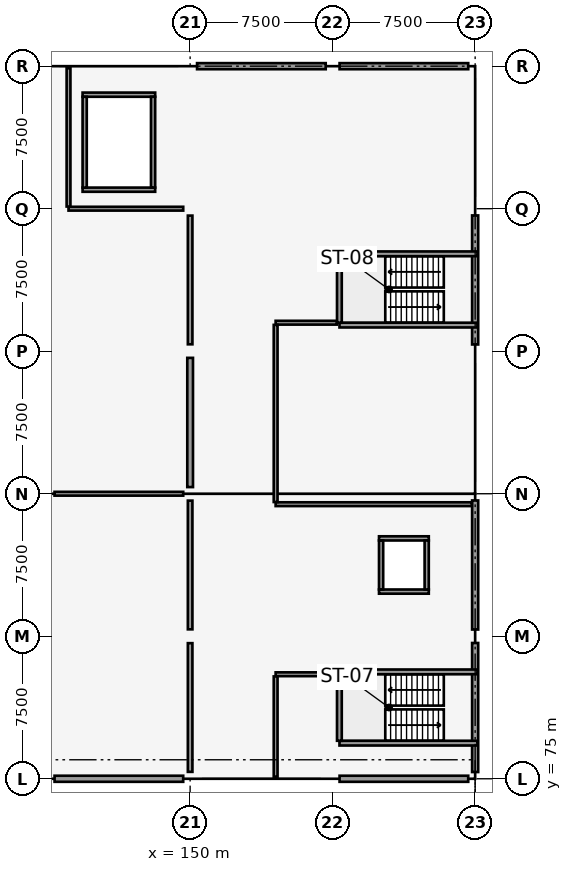
"""IFC4 building model, lengths in metres.
Left out: names, types, materials, properties, quantities, classifications, styles, units other than length and angle.
Written with IfcOpenShell. Run it as: python <this file> out.ifc"""

import sys

from ifc_helpers import new_model, si_unit, direction, frame, frame_2d, origin, origin_2d, place, context, subcontext, project, spatial, rectangle, extrude, element, fill, save


model = new_model("IFC4")
c1 = context("Model", 3, precision=1e-05, world=origin(), true_north=direction((0.0, 1.0)))
c2 = subcontext(c1, "Body", "Model", "MODEL_VIEW")
j1 = project(units=[si_unit("LENGTHUNIT", "METRE"), si_unit("PLANEANGLEUNIT", "RADIAN")], contexts=[c1])
p1 = place(None, origin())
s1 = spatial("IfcSite", under=j1, at=p1, CompositionType="ELEMENT")
p2 = place(p1, origin())
s2 = spatial("IfcBuilding", under=s1, at=p2, CompositionType="ELEMENT")
p3 = place(p2, frame((0.0, 0.0, 4.8)))
s3 = spatial("IfcBuildingStorey", under=s2, at=p3, CompositionType="ELEMENT", Elevation=4.8)
for number, where, z_axis, x_axis in (
    (1, (142.5, 75.0, 0.0), (0.0, 0.0, 1.0), (1.0, 0.0, 0.0)),
    (2, (142.5, 90.0, 0.0), (0.0, 0.0, 1.0), (1.0, 0.0, 0.0)),
    (3, (142.5, 97.5, 0.0), (0.0, 0.0, 1.0), (1.0, 0.0, 0.0)),
    (4, (142.5, 105.0, 0.0), (0.0, 0.0, 1.0), (1.0, 0.0, 0.0)),
    (5, (142.5, 112.5, 0.0), (0.0, 0.0, 1.0), (1.0, 0.0, 0.0)),
    (6, (150.0, 75.0, 0.0), (0.0, 0.0, 1.0), (1.0, 0.0, 0.0)),
    (7, (150.0, 82.5, 0.0), (0.0, 0.0, 1.0), (1.0, 0.0, 0.0)),
    (8, (150.0, 90.0, 0.0), (0.0, 0.0, 1.0), (1.0, 0.0, 0.0)),
    (9, (150.0, 97.5, 0.0), (0.0, 0.0, 1.0), (1.0, 0.0, 0.0)),
    (10, (150.0, 105.0, 0.0), (0.0, 0.0, 1.0), (1.0, 0.0, 0.0)),
    (11, (150.0, 112.5, 0.0), (0.0, 0.0, 1.0), (1.0, 0.0, 0.0)),
    (12, (157.5, 75.0, 0.0), (0.0, 0.0, 1.0), (1.0, 0.0, 0.0)),
    (13, (157.5, 82.5, 0.0), (0.0, 0.0, 1.0), (1.0, 0.0, 0.0)),
    (14, (157.5, 90.0, 0.0), (0.0, 0.0, 1.0), (1.0, 0.0, 0.0)),
    (15, (157.5, 97.5, 0.0), (0.0, 0.0, 1.0), (1.0, 0.0, 0.0)),
    (16, (157.5, 105.0, 0.0), (0.0, 0.0, 1.0), (1.0, 0.0, 0.0)),
    (17, (157.5, 112.5, 0.0), (0.0, 0.0, 1.0), (1.0, 0.0, 0.0)),
    (18, (165.0, 75.0, 0.0), (0.0, 0.0, 1.0), (1.0, 0.0, 0.0)),
    (19, (165.0, 82.5, 0.0), (0.0, 0.0, 1.0), (1.0, 0.0, 0.0)),
    (20, (165.0, 90.0, 0.0), (0.0, 0.0, 1.0), (1.0, 0.0, 0.0)),
    (21, (165.0, 97.5, 0.0), (0.0, 0.0, 1.0), (1.0, 0.0, 0.0)),
    (22, (165.0, 105.0, 0.0), (0.0, 0.0, 1.0), (1.0, 0.0, 0.0)),
    (23, (165.0, 112.5, 0.0), (0.0, 0.0, 1.0), (1.0, 0.0, 0.0)),
):
    element("IfcColumn", number, at=place(p3, frame(where, z_axis=z_axis, x_axis=x_axis)), inside=s3, PredefinedType="COLUMN", context=c2, shape_type="SweptSolid", body=[
        extrude(rectangle(XDim=0.7, YDim=0.7, at=origin_2d()), origin(), (0.0, 0.0, 1.0), 4.2),
    ])
p4 = place(p3, frame((165.0, 86.25, 0.0), z_axis=(0.0, 0.0, 1.0), x_axis=(1.0, 0.0, 0.0)))
e24 = element("IfcColumn", 24, at=p4, inside=s3, PredefinedType="PILASTER", context=c2, shape_type="SweptSolid", body=[
    extrude(rectangle(XDim=0.4, YDim=0.7, at=origin_2d()), origin(), (0.0, 0.0, 1.0), 4.2),
])
p5 = place(p3, frame((150.0, 90.35, 0.0), z_axis=(0.0, 0.0, 1.0), x_axis=(0.0, 1.0, 0.0)))
e25 = element("IfcWall", 25, at=p5, inside=s3, PredefinedType="SHEAR", context=c2, shape_type="SweptSolid", body=[
    extrude(rectangle(XDim=6.8, YDim=0.3, at=frame_2d((3.4, 0.0))), origin(), (0.0, 0.0, 1.0), 3.9),
])
p6 = place(p3, frame((142.865, 75.0, 0.0), z_axis=(0.0, 0.0, 1.0), x_axis=(1.0, 0.0, 0.0)))
e26 = element("IfcWall", 26, at=p6, inside=s3, PredefinedType="SOLIDWALL", context=c2, shape_type="SweptSolid", body=[
    extrude(rectangle(XDim=6.77, YDim=0.32, at=frame_2d((3.385, 0.0))), origin(), (0.0, 0.0, 1.0), 2.89),
])
p7 = place(p6, frame((2.385, 0.0, 0.6)))
e27 = element("IfcOpeningElement", 27, at=p7, cuts=e26, PredefinedType="OPENING", context=c2, shape_type="SweptSolid", body=[
    extrude(rectangle(XDim=2.0, YDim=1.45, at=frame_2d((1.0, 0.725))), frame((0.0, 0.17, 0.0), z_axis=(0.0, -1.0, 0.0), x_axis=(1.0, 0.0, 0.0)), (0.0, 0.0, 1.0), 0.34),
])
p8 = place(p3, frame((150.365, 112.5, 0.0), z_axis=(0.0, 0.0, 1.0), x_axis=(1.0, 0.0, 0.0)))
e28 = element("IfcWall", 28, at=p8, inside=s3, PredefinedType="SOLIDWALL", context=c2, shape_type="SweptSolid", body=[
    extrude(rectangle(XDim=6.77, YDim=0.32, at=frame_2d((3.385, 0.0))), origin(), (0.0, 0.0, 1.0), 3.14),
])
p9 = place(p8, frame((2.235, 0.0, 0.6)))
e29 = element("IfcOpeningElement", 29, at=p9, cuts=e28, PredefinedType="OPENING", context=c2, shape_type="SweptSolid", body=[
    extrude(rectangle(XDim=2.3, YDim=1.3, at=frame_2d((1.15, 0.65))), frame((0.0, 0.17, 0.0), z_axis=(0.0, -1.0, 0.0), x_axis=(1.0, 0.0, 0.0)), (0.0, 0.0, 1.0), 0.34),
])
p10 = place(p3, frame((157.865, 75.0, 0.0), z_axis=(0.0, 0.0, 1.0), x_axis=(1.0, 0.0, 0.0)))
e30 = element("IfcWall", 30, at=p10, inside=s3, PredefinedType="SOLIDWALL", context=c2, shape_type="SweptSolid", body=[
    extrude(rectangle(XDim=6.77, YDim=0.32, at=frame_2d((3.385, 0.0))), origin(), (0.0, 0.0, 1.0), 3.14),
])
p11 = place(p10, frame((2.81, 0.0, 0.6)))
e31 = element("IfcOpeningElement", 31, at=p11, cuts=e30, PredefinedType="OPENING", context=c2, shape_type="SweptSolid", body=[
    extrude(rectangle(XDim=1.15, YDim=1.3, at=frame_2d((0.575, 0.65))), frame((0.0, 0.17, 0.0), z_axis=(0.0, -1.0, 0.0), x_axis=(1.0, 0.0, 0.0)), (0.0, 0.0, 1.0), 0.34),
])
p12 = place(p3, frame((157.865, 112.5, 0.0), z_axis=(0.0, 0.0, 1.0), x_axis=(1.0, 0.0, 0.0)))
e32 = element("IfcWall", 32, at=p12, inside=s3, PredefinedType="SOLIDWALL", context=c2, shape_type="SweptSolid", body=[
    extrude(rectangle(XDim=6.77, YDim=0.32, at=frame_2d((3.385, 0.0))), origin(), (0.0, 0.0, 1.0), 3.14),
])
p13 = place(p12, frame((2.785, 0.0, 0.6)))
e33 = element("IfcOpeningElement", 33, at=p13, cuts=e32, PredefinedType="OPENING", context=c2, shape_type="SweptSolid", body=[
    extrude(rectangle(XDim=1.2, YDim=1.2, at=frame_2d((0.6, 0.6))), frame((0.0, 0.17, 0.0), z_axis=(0.0, -1.0, 0.0), x_axis=(1.0, 0.0, 0.0)), (0.0, 0.0, 1.0), 0.34),
])
p14 = place(p3, frame((165.0, 75.355, 0.0), z_axis=(0.0, 0.0, 1.0), x_axis=(0.0, 1.0, 0.0)))
e34 = element("IfcWall", 34, at=p14, inside=s3, PredefinedType="SOLIDWALL", context=c2, shape_type="SweptSolid", body=[
    extrude(rectangle(XDim=6.79, YDim=0.32, at=frame_2d((3.395, 0.0))), origin(), (0.0, 0.0, 1.0), 3.09),
])
p15 = place(p3, frame((165.0, 82.855, 0.0), z_axis=(0.0, 0.0, 1.0), x_axis=(0.0, 1.0, 0.0)))
e35 = element("IfcWall", 35, at=p15, inside=s3, PredefinedType="SOLIDWALL", context=c2, shape_type="SweptSolid", body=[
    extrude(rectangle(XDim=6.79, YDim=0.32, at=frame_2d((3.395, 0.0))), origin(), (0.0, 0.0, 1.0), 3.04),
])
p16 = place(p3, frame((165.0, 97.855, 0.0), z_axis=(0.0, 0.0, 1.0), x_axis=(0.0, 1.0, 0.0)))
e36 = element("IfcWall", 36, at=p16, inside=s3, PredefinedType="SOLIDWALL", context=c2, shape_type="SweptSolid", body=[
    extrude(rectangle(XDim=6.79, YDim=0.32, at=frame_2d((3.395, 0.0))), origin(), (0.0, 0.0, 1.0), 2.84),
])
p17 = place(p3, frame((157.86, 76.875, 0.0), z_axis=(0.0, 0.0, 1.0), x_axis=(1.0, 0.0, 0.0)))
e37 = element("IfcWall", 37, at=p17, inside=s3, PredefinedType="SOLIDWALL", context=c2, shape_type="SweptSolid", body=[
    extrude(rectangle(XDim=7.26, YDim=0.25, at=frame_2d((3.63, 0.0))), origin(), (0.0, 0.0, 1.0), 3.92),
])
p18 = place(p3, frame((157.86, 80.625, 0.0), z_axis=(0.0, 0.0, 1.0), x_axis=(1.0, 0.0, 0.0)))
e38 = element("IfcWall", 38, at=p18, inside=s3, PredefinedType="SOLIDWALL", context=c2, shape_type="SweptSolid", body=[
    extrude(rectangle(XDim=7.26, YDim=0.25, at=frame_2d((3.63, 0.0))), origin(), (0.0, 0.0, 1.0), 3.92),
])
p19 = place(p18, frame((5.71, 0.0, 0.0)))
e39 = element("IfcOpeningElement", 39, at=p19, cuts=e38, PredefinedType="OPENING", context=c2, shape_type="SweptSolid", body=[
    extrude(rectangle(XDim=1.1, YDim=2.15, at=frame_2d((0.55, 1.075))), frame((0.0, 0.135, 0.0), z_axis=(0.0, -1.0, 0.0), x_axis=(1.0, 0.0, 0.0)), (0.0, 0.0, 1.0), 0.27),
])
p20 = place(p3, frame((157.855, 77.0, 0.0), z_axis=(0.0, 0.0, 1.0), x_axis=(0.0, 1.0, 0.0)))
e40 = element("IfcWall", 40, at=p20, inside=s3, PredefinedType="SOLIDWALL", context=c2, shape_type="SweptSolid", body=[
    extrude(rectangle(XDim=3.5, YDim=0.25, at=frame_2d((1.75, 0.0))), origin(), (0.0, 0.0, 1.0), 3.92),
])
p21 = place(p3, frame((157.86, 98.875, 0.0), z_axis=(0.0, 0.0, 1.0), x_axis=(1.0, 0.0, 0.0)))
e41 = element("IfcWall", 41, at=p21, inside=s3, PredefinedType="SOLIDWALL", context=c2, shape_type="SweptSolid", body=[
    extrude(rectangle(XDim=7.26, YDim=0.25, at=frame_2d((3.63, 0.0))), origin(), (0.0, 0.0, 1.0), 3.92),
])
p22 = place(p3, frame((157.86, 102.625, 0.0), z_axis=(0.0, 0.0, 1.0), x_axis=(1.0, 0.0, 0.0)))
e42 = element("IfcWall", 42, at=p22, inside=s3, PredefinedType="SOLIDWALL", context=c2, shape_type="SweptSolid", body=[
    extrude(rectangle(XDim=7.26, YDim=0.25, at=frame_2d((3.63, 0.0))), origin(), (0.0, 0.0, 1.0), 3.92),
])
p23 = place(p22, frame((5.71, 0.0, 0.0)))
e43 = element("IfcOpeningElement", 43, at=p23, cuts=e42, PredefinedType="OPENING", context=c2, shape_type="SweptSolid", body=[
    extrude(rectangle(XDim=1.1, YDim=2.15, at=frame_2d((0.55, 1.075))), frame((0.0, 0.135, 0.0), z_axis=(0.0, -1.0, 0.0), x_axis=(1.0, 0.0, 0.0)), (0.0, 0.0, 1.0), 0.27),
])
p24 = place(p3, frame((157.855, 99.0, 0.0), z_axis=(0.0, 0.0, 1.0), x_axis=(0.0, 1.0, 0.0)))
e44 = element("IfcWall", 44, at=p24, inside=s3, PredefinedType="SOLIDWALL", context=c2, shape_type="SweptSolid", body=[
    extrude(rectangle(XDim=3.5, YDim=0.25, at=frame_2d((1.75, 0.0))), origin(), (0.0, 0.0, 1.0), 3.92),
])
for number, where, z_axis, x_axis in (
    (45, (159.94, 84.85, 0.0), (0.0, 0.0, 1.0), (1.0, 0.0, 0.0)),
    (46, (159.94, 87.65, 0.0), (0.0, 0.0, 1.0), (1.0, 0.0, 0.0)),
):
    element("IfcWall", number, at=place(p3, frame(where, z_axis=z_axis, x_axis=x_axis)), inside=s3, PredefinedType="SOLIDWALL", context=c2, shape_type="SweptSolid", body=[
        extrude(rectangle(XDim=2.62, YDim=0.22, at=frame_2d((1.31, 0.0))), origin(), (0.0, 0.0, 1.0), 3.92),
    ])
p25 = place(p3, frame((160.05, 84.96, 0.0), z_axis=(0.0, 0.0, 1.0), x_axis=(0.0, 1.0, 0.0)))
e47 = element("IfcWall", 47, at=p25, inside=s3, PredefinedType="SOLIDWALL", context=c2, shape_type="SweptSolid", body=[
    extrude(rectangle(XDim=2.58, YDim=0.22, at=frame_2d((1.29, 0.0))), origin(), (0.0, 0.0, 1.0), 3.92),
])
p26 = place(p25, frame((0.79, 0.0, 0.0)))
e48 = element("IfcOpeningElement", 48, at=p26, cuts=e47, PredefinedType="OPENING", context=c2, shape_type="SweptSolid", body=[
    extrude(rectangle(XDim=1.0, YDim=2.15, at=frame_2d((0.5, 1.075))), frame((0.0, 0.12, 0.0), z_axis=(0.0, -1.0, 0.0), x_axis=(1.0, 0.0, 0.0)), (0.0, 0.0, 1.0), 0.24),
])
p27 = place(p3, frame((162.45, 84.96, 0.0), z_axis=(0.0, 0.0, 1.0), x_axis=(0.0, 1.0, 0.0)))
e49 = element("IfcWall", 49, at=p27, inside=s3, PredefinedType="SOLIDWALL", context=c2, shape_type="SweptSolid", body=[
    extrude(rectangle(XDim=2.58, YDim=0.22, at=frame_2d((1.29, 0.0))), origin(), (0.0, 0.0, 1.0), 3.92),
])
p28 = place(p3, frame((144.34, 106.0, 0.0), z_axis=(0.0, 0.0, 1.0), x_axis=(1.0, 0.0, 0.0)))
e50 = element("IfcWall", 50, at=p28, inside=s3, PredefinedType="SOLIDWALL", context=c2, shape_type="SweptSolid", body=[
    extrude(rectangle(XDim=3.82, YDim=0.22, at=frame_2d((1.91, 0.0))), origin(), (0.0, 0.0, 1.0), 3.92),
])
p29 = place(p28, frame((0.81, 0.0, 0.0)))
e51 = element("IfcOpeningElement", 51, at=p29, cuts=e50, PredefinedType="OPENING", context=c2, shape_type="SweptSolid", body=[
    extrude(rectangle(XDim=2.2, YDim=2.35, at=frame_2d((1.1, 1.175))), frame((0.0, 0.12, 0.0), z_axis=(0.0, -1.0, 0.0), x_axis=(1.0, 0.0, 0.0)), (0.0, 0.0, 1.0), 0.24),
])
p30 = place(p3, frame((144.34, 111.0, 0.0), z_axis=(0.0, 0.0, 1.0), x_axis=(1.0, 0.0, 0.0)))
e52 = element("IfcWall", 52, at=p30, inside=s3, PredefinedType="SOLIDWALL", context=c2, shape_type="SweptSolid", body=[
    extrude(rectangle(XDim=3.82, YDim=0.22, at=frame_2d((1.91, 0.0))), origin(), (0.0, 0.0, 1.0), 3.92),
])
for number, where, z_axis, x_axis in (
    (53, (144.45, 106.11, 0.0), (0.0, 0.0, 1.0), (0.0, 1.0, 0.0)),
    (54, (148.05, 106.11, 0.0), (0.0, 0.0, 1.0), (0.0, 1.0, 0.0)),
):
    element("IfcWall", number, at=place(p3, frame(where, z_axis=z_axis, x_axis=x_axis)), inside=s3, PredefinedType="SOLIDWALL", context=c2, shape_type="SweptSolid", body=[
        extrude(rectangle(XDim=4.78, YDim=0.22, at=frame_2d((2.39, 0.0))), origin(), (0.0, 0.0, 1.0), 3.92),
    ])
p31 = place(p3, frame((143.6, 105.0, 0.0), z_axis=(0.0, 0.0, 1.0), x_axis=(1.0, 0.0, 0.0)))
e55 = element("IfcWall", 55, at=p31, inside=s3, PredefinedType="PARTITIONING", context=c2, shape_type="SweptSolid", body=[
    extrude(rectangle(XDim=6.036, YDim=0.2, at=frame_2d((3.018, 0.0))), origin(), (0.0, 0.0, 1.0), 3.04),
])
p32 = place(p3, frame((143.6, 105.114, 0.0), z_axis=(0.0, 0.0, 1.0), x_axis=(0.0, 1.0, 0.0)))
e56 = element("IfcWall", 56, at=p32, inside=s3, PredefinedType="PARTITIONING", context=c2, shape_type="SweptSolid", body=[
    extrude(rectangle(XDim=7.274, YDim=0.2, at=frame_2d((3.637, 0.0))), origin(), (0.0, 0.0, 1.0), 3.04),
])
p33 = place(p32, frame((2.786, 0.0, 0.0)))
e57 = element("IfcOpeningElement", 57, at=p33, cuts=e56, PredefinedType="OPENING", context=c2, shape_type="SweptSolid", body=[
    extrude(rectangle(XDim=1.2, YDim=2.15, at=frame_2d((0.6, 1.075))), frame((0.0, 0.11, 0.0), z_axis=(0.0, -1.0, 0.0), x_axis=(1.0, 0.0, 0.0)), (0.0, 0.0, 1.0), 0.22),
])
p34 = place(p3, frame((154.5, 80.5, 0.0), z_axis=(0.0, 0.0, 1.0), x_axis=(1.0, 0.0, 0.0)))
e58 = element("IfcWall", 58, at=p34, inside=s3, PredefinedType="PARTITIONING", context=c2, shape_type="SweptSolid", body=[
    extrude(rectangle(XDim=3.216, YDim=0.2, at=frame_2d((1.608, 0.0))), origin(), (0.0, 0.0, 1.0), 3.19),
])
p35 = place(p3, frame((154.5, 75.112, 0.0), z_axis=(0.0, 0.0, 1.0), x_axis=(0.0, 1.0, 0.0)))
e59 = element("IfcWall", 59, at=p35, inside=s3, PredefinedType="PARTITIONING", context=c2, shape_type="SweptSolid", body=[
    extrude(rectangle(XDim=5.274, YDim=0.2, at=frame_2d((2.637, 0.0))), origin(), (0.0, 0.0, 1.0), 3.14),
])
p36 = place(p3, frame((154.5, 89.45, 0.0), z_axis=(0.0, 0.0, 1.0), x_axis=(1.0, 0.0, 0.0)))
e60 = element("IfcWall", 60, at=p36, inside=s3, PredefinedType="PARTITIONING", context=c2, shape_type="SweptSolid", body=[
    extrude(rectangle(XDim=10.326, YDim=0.2, at=frame_2d((5.163, 0.0))), origin(), (0.0, 0.0, 1.0), 2.84),
])
p37 = place(p3, frame((154.5, 99.0, 0.0), z_axis=(0.0, 0.0, 1.0), x_axis=(1.0, 0.0, 0.0)))
e61 = element("IfcWall", 61, at=p37, inside=s3, PredefinedType="PARTITIONING", context=c2, shape_type="SweptSolid", body=[
    extrude(rectangle(XDim=3.216, YDim=0.2, at=frame_2d((1.608, 0.0))), origin(), (0.0, 0.0, 1.0), 3.27),
])
p38 = place(p3, frame((154.5, 89.564, 0.0), z_axis=(0.0, 0.0, 1.0), x_axis=(0.0, 1.0, 0.0)))
e62 = element("IfcWall", 62, at=p38, inside=s3, PredefinedType="PARTITIONING", context=c2, shape_type="SweptSolid", body=[
    extrude(rectangle(XDim=9.322, YDim=0.2, at=frame_2d((4.661, 0.0))), origin(), (0.0, 0.0, 1.0), 2.84),
])
p39 = place(p38, frame((4.086, 0.0, 0.0)))
e63 = element("IfcOpeningElement", 63, at=p39, cuts=e62, PredefinedType="OPENING", context=c2, shape_type="SweptSolid", body=[
    extrude(rectangle(XDim=1.1, YDim=2.15, at=frame_2d((0.55, 1.075))), frame((0.0, 0.11, 0.0), z_axis=(0.0, -1.0, 0.0), x_axis=(1.0, 0.0, 0.0)), (0.0, 0.0, 1.0), 0.22),
])
p40 = place(p3, frame((142.864, 90.0, 0.0), z_axis=(0.0, 0.0, 1.0), x_axis=(1.0, 0.0, 0.0)))
e64 = element("IfcWall", 64, at=p40, inside=s3, PredefinedType="PARTITIONING", context=c2, shape_type="SweptSolid", body=[
    extrude(rectangle(XDim=6.772, YDim=0.2, at=frame_2d((3.386, 0.0))), origin(), (0.0, 0.0, 1.0), 2.84),
])
p41 = place(p3, frame((150.0, 75.364, 0.0), z_axis=(0.0, 0.0, 1.0), x_axis=(0.0, 1.0, 0.0)))
e65 = element("IfcWall", 65, at=p41, inside=s3, PredefinedType="PARTITIONING", context=c2, shape_type="SweptSolid", body=[
    extrude(rectangle(XDim=6.772, YDim=0.24, at=frame_2d((3.386, 0.0))), origin(), (0.0, 0.0, 1.0), 2.94),
])
p42 = place(p41, frame((2.586, 0.0, 0.0)))
e66 = element("IfcOpeningElement", 66, at=p42, cuts=e65, PredefinedType="OPENING", context=c2, shape_type="SweptSolid", body=[
    extrude(rectangle(XDim=1.6, YDim=2.16, at=frame_2d((0.8, 1.08))), frame((0.0, 0.13, 0.0), z_axis=(0.0, -1.0, 0.0), x_axis=(1.0, 0.0, 0.0)), (0.0, 0.0, 1.0), 0.26),
])
p43 = place(p3, frame((150.0, 82.864, 0.0), z_axis=(0.0, 0.0, 1.0), x_axis=(0.0, 1.0, 0.0)))
e67 = element("IfcWall", 67, at=p43, inside=s3, PredefinedType="PARTITIONING", context=c2, shape_type="SweptSolid", body=[
    extrude(rectangle(XDim=6.772, YDim=0.24, at=frame_2d((3.386, 0.0))), origin(), (0.0, 0.0, 1.0), 2.84),
])
p44 = place(p3, frame((150.0, 97.864, 0.0), z_axis=(0.0, 0.0, 1.0), x_axis=(0.0, 1.0, 0.0)))
e68 = element("IfcWall", 68, at=p44, inside=s3, PredefinedType="PARTITIONING", context=c2, shape_type="SweptSolid", body=[
    extrude(rectangle(XDim=6.772, YDim=0.24, at=frame_2d((3.386, 0.0))), origin(), (0.0, 0.0, 1.0), 2.99),
])
p45 = place(p44, frame((2.586, 0.0, 0.0)))
e69 = element("IfcOpeningElement", 69, at=p45, cuts=e68, PredefinedType="OPENING", context=c2, shape_type="SweptSolid", body=[
    extrude(rectangle(XDim=1.6, YDim=2.16, at=frame_2d((0.8, 1.08))), frame((0.0, 0.13, 0.0), z_axis=(0.0, -1.0, 0.0), x_axis=(1.0, 0.0, 0.0)), (0.0, 0.0, 1.0), 0.26),
])
p46 = place(p7, origin())
e70 = element("IfcWindow", 70, at=p46, inside=s3, PartitioningType="SINGLE_PANEL", PredefinedType="WINDOW", context=c2, shape_type="SweptSolid", body=[
    extrude(rectangle(XDim=2.0, YDim=1.45, at=frame_2d((1.0, 0.725))), frame((0.0, 0.03, 0.0), z_axis=(0.0, -1.0, 0.0), x_axis=(1.0, 0.0, 0.0)), (0.0, 0.0, 1.0), 0.06),
])
fill(e27, e70)
p47 = place(p9, origin())
e71 = element("IfcWindow", 71, at=p47, inside=s3, PartitioningType="SINGLE_PANEL", PredefinedType="WINDOW", context=c2, shape_type="SweptSolid", body=[
    extrude(rectangle(XDim=2.3, YDim=1.3, at=frame_2d((1.15, 0.65))), frame((0.0, 0.03, 0.0), z_axis=(0.0, -1.0, 0.0), x_axis=(1.0, 0.0, 0.0)), (0.0, 0.0, 1.0), 0.06),
])
fill(e29, e71)
p48 = place(p11, origin())
e72 = element("IfcWindow", 72, at=p48, inside=s3, PartitioningType="SINGLE_PANEL", PredefinedType="WINDOW", context=c2, shape_type="SweptSolid", body=[
    extrude(rectangle(XDim=1.15, YDim=1.3, at=frame_2d((0.575, 0.65))), frame((0.0, 0.03, 0.0), z_axis=(0.0, -1.0, 0.0), x_axis=(1.0, 0.0, 0.0)), (0.0, 0.0, 1.0), 0.06),
])
fill(e31, e72)
p49 = place(p13, origin())
e73 = element("IfcWindow", 73, at=p49, inside=s3, PartitioningType="SINGLE_PANEL", PredefinedType="WINDOW", context=c2, shape_type="SweptSolid", body=[
    extrude(rectangle(XDim=1.2, YDim=1.2, at=frame_2d((0.6, 0.6))), frame((0.0, 0.03, 0.0), z_axis=(0.0, -1.0, 0.0), x_axis=(1.0, 0.0, 0.0)), (0.0, 0.0, 1.0), 0.06),
])
fill(e33, e73)
p50 = place(p19, origin())
e74 = element("IfcDoor", 74, at=p50, inside=s3, OperationType="SINGLE_SWING_RIGHT", PredefinedType="DOOR", context=c2, shape_type="SweptSolid", body=[
    extrude(rectangle(XDim=1.1, YDim=2.15, at=frame_2d((0.55, 1.075))), frame((0.0, 0.025, 0.0), z_axis=(0.0, -1.0, 0.0), x_axis=(1.0, 0.0, 0.0)), (0.0, 0.0, 1.0), 0.05),
])
fill(e39, e74)
p51 = place(p23, origin())
e75 = element("IfcDoor", 75, at=p51, inside=s3, OperationType="SINGLE_SWING_RIGHT", PredefinedType="DOOR", context=c2, shape_type="SweptSolid", body=[
    extrude(rectangle(XDim=1.1, YDim=2.15, at=frame_2d((0.55, 1.075))), frame((0.0, 0.025, 0.0), z_axis=(0.0, -1.0, 0.0), x_axis=(1.0, 0.0, 0.0)), (0.0, 0.0, 1.0), 0.05),
])
fill(e43, e75)
p52 = place(p26, origin())
e76 = element("IfcDoor", 76, at=p52, inside=s3, OperationType="SLIDING_TO_LEFT", PredefinedType="DOOR", context=c2, shape_type="SweptSolid", body=[
    extrude(rectangle(XDim=1.0, YDim=2.15, at=frame_2d((0.5, 1.075))), frame((0.0, 0.025, 0.0), z_axis=(0.0, -1.0, 0.0), x_axis=(1.0, 0.0, 0.0)), (0.0, 0.0, 1.0), 0.05),
])
fill(e48, e76)
p53 = place(p29, origin())
e77 = element("IfcDoor", 77, at=p53, inside=s3, OperationType="DOUBLE_DOOR_SLIDING", PredefinedType="DOOR", context=c2, shape_type="SweptSolid", body=[
    extrude(rectangle(XDim=2.2, YDim=2.35, at=frame_2d((1.1, 1.175))), frame((0.0, 0.025, 0.0), z_axis=(0.0, -1.0, 0.0), x_axis=(1.0, 0.0, 0.0)), (0.0, 0.0, 1.0), 0.05),
])
fill(e51, e77)
p54 = place(p33, origin())
e78 = element("IfcDoor", 78, at=p54, inside=s3, OperationType="SINGLE_SWING_RIGHT", PredefinedType="DOOR", context=c2, shape_type="SweptSolid", body=[
    extrude(rectangle(XDim=1.2, YDim=2.15, at=frame_2d((0.6, 1.075))), frame((0.0, 0.025, 0.0), z_axis=(0.0, -1.0, 0.0), x_axis=(1.0, 0.0, 0.0)), (0.0, 0.0, 1.0), 0.05),
])
fill(e57, e78)
p55 = place(p39, origin())
e79 = element("IfcDoor", 79, at=p55, inside=s3, OperationType="SINGLE_SWING_LEFT", PredefinedType="DOOR", context=c2, shape_type="SweptSolid", body=[
    extrude(rectangle(XDim=1.1, YDim=2.15, at=frame_2d((0.55, 1.075))), frame((0.0, 0.025, 0.0), z_axis=(0.0, -1.0, 0.0), x_axis=(1.0, 0.0, 0.0)), (0.0, 0.0, 1.0), 0.05),
])
fill(e63, e79)
p56 = place(p42, origin())
e80 = element("IfcDoor", 80, at=p56, inside=s3, OperationType="SINGLE_SWING_LEFT", PredefinedType="DOOR", context=c2, shape_type="SweptSolid", body=[
    extrude(rectangle(XDim=1.6, YDim=2.16, at=frame_2d((0.8, 1.08))), frame((0.0, 0.025, 0.0), z_axis=(0.0, -1.0, 0.0), x_axis=(1.0, 0.0, 0.0)), (0.0, 0.0, 1.0), 0.05),
])
fill(e66, e80)
p57 = place(p45, origin())
e81 = element("IfcDoor", 81, at=p57, inside=s3, OperationType="SINGLE_SWING_RIGHT", PredefinedType="DOOR", context=c2, shape_type="SweptSolid", body=[
    extrude(rectangle(XDim=1.6, YDim=2.16, at=frame_2d((0.8, 1.08))), frame((0.0, 0.025, 0.0), z_axis=(0.0, -1.0, 0.0), x_axis=(1.0, 0.0, 0.0)), (0.0, 0.0, 1.0), 0.05),
])
fill(e69, e81)
save(model, sys.argv[1])
